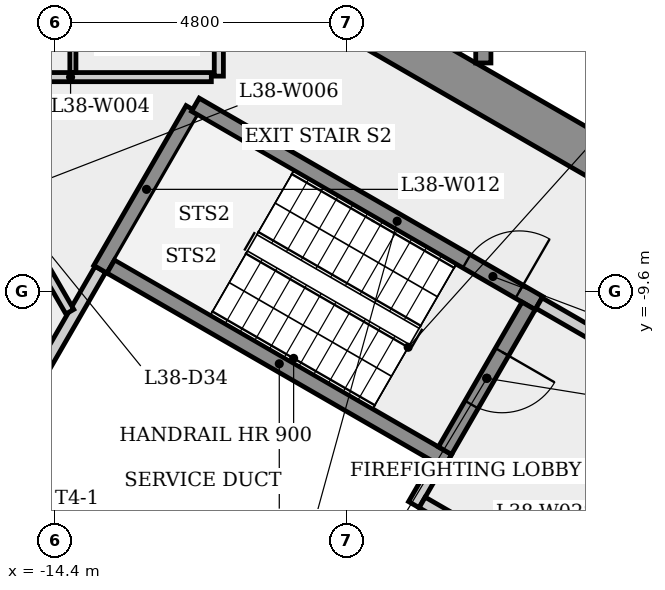
"""IFC4 building model, lengths in metres.
Left out: names, types, materials, properties, quantities, classifications, styles, units other than length and angle.
Written with IfcOpenShell. Run it as: python <this file> out.ifc"""

import sys

from ifc_helpers import new_model, si_unit, direction, frame, frame_2d, origin, place, context, subcontext, project, spatial, rectangle, extrude, element, fill, save


model = new_model("IFC4")
c1 = context("Model", 3, precision=1e-05, world=origin(), true_north=direction((0.0, 1.0)))
c2 = subcontext(c1, "Body", "Model", "MODEL_VIEW")
j1 = project(units=[si_unit("LENGTHUNIT", "METRE"), si_unit("PLANEANGLEUNIT", "RADIAN")], contexts=[c1])
p1 = place(None, origin())
s1 = spatial("IfcSite", under=j1, at=p1, CompositionType="ELEMENT")
p2 = place(p1, origin())
s2 = spatial("IfcBuilding", under=s1, at=p2, CompositionType="ELEMENT")
p3 = place(p2, frame((0.0, 0.0, 143.9)))
s3 = spatial("IfcBuildingStorey", under=s2, at=p3, CompositionType="ELEMENT", Elevation=143.9)
p4 = place(p3, frame((-9.325, -5.182, 0.0), z_axis=(0.0, 0.0, 1.0), x_axis=(0.866023993627, -0.500002442456, 0.0)))
e1 = element("IfcWall", 1, at=p4, inside=s3, PredefinedType="SHEAR", context=c2, shape_type="SweptSolid", body=[
    extrude(rectangle(XDim=10.97, YDim=0.7, at=frame_2d((5.485, 0.0))), origin(), (0.0, 0.0, 1.0), 4.0),
])
p5 = place(p4, frame((5.682, 0.0, 0.0)))
e2 = element("IfcOpeningElement", 2, at=p5, cuts=e1, PredefinedType="OPENING", context=c2, shape_type="SweptSolid", body=[
    extrude(rectangle(XDim=0.9, YDim=2.1, at=frame_2d((0.45, 1.05))), frame((0.0, 0.36, 0.0), z_axis=(0.0, -1.0, 0.0), x_axis=(1.0, 0.0, 0.0)), (0.0, 0.0, 1.0), 0.72),
])
p6 = place(p3, frame((-16.453, -6.078, 0.0), z_axis=(0.0, 0.0, 1.0), x_axis=(1.0, 0.0, 0.0)))
e3 = element("IfcWall", 3, at=p6, inside=s3, PredefinedType="PARTITIONING", context=c2, shape_type="SweptSolid", body=[
    extrude(rectangle(XDim=4.63, YDim=0.15, at=frame_2d((2.315, 0.0))), origin(), (0.0, 0.0, 1.0), 3.6),
])
p7 = place(p6, frame((0.766, 0.0, 0.0)))
e4 = element("IfcOpeningElement", 4, at=p7, cuts=e3, PredefinedType="OPENING", context=c2, shape_type="SweptSolid", body=[
    extrude(rectangle(XDim=0.9, YDim=2.1, at=frame_2d((0.45, 1.05))), frame((0.0, 0.085, 0.0), z_axis=(0.0, -1.0, 0.0), x_axis=(1.0, 0.0, 0.0)), (0.0, 0.0, 1.0), 0.17),
])
p8 = place(p3, frame((-16.276, -13.791, 0.0), z_axis=(0.0, 0.0, 1.0), x_axis=(0.499970375258, 0.866042506961, 0.0)))
e5 = element("IfcWall", 5, at=p8, inside=s3, PredefinedType="PLUMBINGWALL", context=c2, shape_type="SweptSolid", body=[
    extrude(rectangle(XDim=5.257, YDim=0.2, at=frame_2d((2.628, 0.0))), origin(), (0.0, 0.0, 1.0), 3.6),
])
p9 = place(p3, frame((-14.151, -9.937, 0.0), z_axis=(0.0, 0.0, 1.0), x_axis=(-0.500029633093, 0.866008294434, 0.0)))
e6 = element("IfcWall", 6, at=p9, inside=s3, PredefinedType="PARTITIONING", context=c2, shape_type="SweptSolid", body=[
    extrude(rectangle(XDim=4.38, YDim=0.15, at=frame_2d((2.19, 0.0))), origin(), (0.0, 0.0, 1.0), 3.6),
])
p10 = place(p9, frame((1.69, 0.0, 0.0)))
e7 = element("IfcOpeningElement", 7, at=p10, cuts=e6, PredefinedType="OPENING", context=c2, shape_type="SweptSolid", body=[
    extrude(rectangle(XDim=1.0, YDim=2.1, at=frame_2d((0.5, 1.05))), frame((0.0, 0.085, 0.0), z_axis=(0.0, -1.0, 0.0), x_axis=(1.0, 0.0, 0.0)), (0.0, 0.0, 1.0), 0.17),
])
p11 = place(p3, frame((-14.1, -3.676, 0.0), z_axis=(0.0, 0.0, 1.0), x_axis=(0.0, -1.0, 0.0)))
e8 = element("IfcWall", 8, at=p11, inside=s3, PredefinedType="PARTITIONING", context=c2, shape_type="SweptSolid", body=[
    extrude(rectangle(XDim=2.327, YDim=0.1, at=frame_2d((1.164, 0.0))), origin(), (0.0, 0.0, 1.0), 3.6),
])
p12 = place(p3, frame((-13.648, -9.239, 0.0), z_axis=(0.0, 0.0, 1.0), x_axis=(0.50000556753, 0.866022189346, 0.0)))
e9 = element("IfcWall", 9, at=p12, inside=s3, PredefinedType="SHEAR", context=c2, shape_type="SweptSolid", body=[
    extrude(rectangle(XDim=3.036, YDim=0.25, at=frame_2d((1.518, 0.0))), origin(), (0.0, 0.0, 1.0), 3.6),
])
p13 = place(p3, frame((-12.085, -6.532, 0.0), z_axis=(0.0, 0.0, 1.0), x_axis=(0.86604373436, -0.499968249168, 0.0)))
e10 = element("IfcWall", 10, at=p13, inside=s3, PredefinedType="SHEAR", context=c2, shape_type="SweptSolid", body=[
    extrude(rectangle(XDim=1.118, YDim=0.25, at=frame_2d((0.559, 0.0))), origin(), (0.0, 0.0, 1.0), 3.6),
])
p14 = place(p3, frame((-11.7, 6.062, 0.0), z_axis=(0.0, 0.0, 1.0), x_axis=(0.0, -1.0, 0.0)))
e11 = element("IfcWall", 11, at=p14, inside=s3, PredefinedType="PARTITIONING", context=c2, shape_type="SweptSolid", body=[
    extrude(rectangle(XDim=12.125, YDim=0.15, at=frame_2d((6.062, 0.0))), origin(), (0.0, 0.0, 1.0), 3.6),
])
p15 = place(p14, frame((6.788, 0.0, 0.0)))
e12 = element("IfcOpeningElement", 12, at=p15, cuts=e11, PredefinedType="OPENING", context=c2, shape_type="SweptSolid", body=[
    extrude(rectangle(XDim=0.9, YDim=2.1, at=frame_2d((0.45, 1.05))), frame((0.0, 0.085, 0.0), z_axis=(0.0, -1.0, 0.0), x_axis=(1.0, 0.0, 0.0)), (0.0, 0.0, 1.0), 0.17),
])
p16 = place(p3, frame((-11.1, -7.101, 0.0), z_axis=(0.0, 0.0, 1.0), x_axis=(0.866028615007, -0.499994437958, 0.0)))
e13 = element("IfcWall", 13, at=p16, inside=s3, PredefinedType="SHEAR", context=c2, shape_type="SweptSolid", body=[
    extrude(rectangle(XDim=5.387, YDim=0.25, at=frame_2d((2.694, 0.0))), origin(), (0.0, 0.0, 1.0), 3.6),
])
p17 = place(p16, frame((4.012, 0.0, 0.0)))
e14 = element("IfcOpeningElement", 14, at=p17, cuts=e13, PredefinedType="OPENING", context=c2, shape_type="SweptSolid", body=[
    extrude(rectangle(XDim=1.0, YDim=2.1, at=frame_2d((0.5, 1.05))), frame((0.0, 0.135, 0.0), z_axis=(0.0, -1.0, 0.0), x_axis=(1.0, 0.0, 0.0)), (0.0, 0.0, 1.0), 0.27),
])
p18 = place(p3, frame((-8.493, -13.11, 0.0), z_axis=(0.0, 0.0, 1.0), x_axis=(0.500067724834, 0.865986299303, 0.0)))
e15 = element("IfcWall", 15, at=p18, inside=s3, PredefinedType="PLUMBINGWALL", context=c2, shape_type="SweptSolid", body=[
    extrude(rectangle(XDim=0.775, YDim=0.2, at=frame_2d((0.388, 0.0))), origin(), (0.0, 0.0, 1.0), 3.6),
])
p19 = place(p3, frame((-7.935, -12.393, 0.0), z_axis=(0.0, 0.0, 1.0), x_axis=(-0.866025499775, 0.499999833739, 0.0)))
e16 = element("IfcWall", 16, at=p19, inside=s3, PredefinedType="SHEAR", context=c2, shape_type="SweptSolid", body=[
    extrude(rectangle(XDim=6.4, YDim=0.25, at=frame_2d((3.2, 0.0))), origin(), (0.0, 0.0, 1.0), 3.6),
])
p20 = place(p3, frame((-8.356, -13.073, 0.0), z_axis=(0.0, 0.0, 1.0), x_axis=(0.866038532462, -0.499977259774, 0.0)))
e17 = element("IfcWall", 17, at=p20, inside=s3, PredefinedType="PLUMBINGWALL", context=c2, shape_type="SweptSolid", body=[
    extrude(rectangle(XDim=4.7, YDim=0.2, at=frame_2d((2.35, 0.0))), origin(), (0.0, 0.0, 1.0), 3.6),
])
p21 = place(p3, frame((-7.35, -5.846, 0.0), z_axis=(0.0, 0.0, 1.0), x_axis=(0.0, 1.0, 0.0)))
e18 = element("IfcWall", 18, at=p21, inside=s3, PredefinedType="SHEAR", context=c2, shape_type="SweptSolid", body=[
    extrude(rectangle(XDim=4.171, YDim=0.25, at=frame_2d((2.085, 0.0))), origin(), (0.0, 0.0, 1.0), 3.6),
])
p22 = place(p3, frame((-6.605, -9.841, 0.0), z_axis=(0.0, 0.0, 1.0), x_axis=(-0.499996545922, -0.866027397988, 0.0)))
e19 = element("IfcWall", 19, at=p22, inside=s3, PredefinedType="SHEAR", context=c2, shape_type="SweptSolid", body=[
    extrude(rectangle(XDim=2.75, YDim=0.25, at=frame_2d((1.375, 0.0))), origin(), (0.0, 0.0, 1.0), 3.6),
])
p23 = place(p22, frame((0.875, 0.0, 0.0)))
e20 = element("IfcOpeningElement", 20, at=p23, cuts=e19, PredefinedType="OPENING", context=c2, shape_type="SweptSolid", body=[
    extrude(rectangle(XDim=1.0, YDim=2.1, at=frame_2d((0.5, 1.05))), frame((0.0, 0.135, 0.0), z_axis=(0.0, -1.0, 0.0), x_axis=(1.0, 0.0, 0.0)), (0.0, 0.0, 1.0), 0.27),
])
p24 = place(p3, frame((-6.435, -9.795, 0.0), z_axis=(0.0, 0.0, 1.0), x_axis=(0.866012907634, -0.500021643343, 0.0)))
e21 = element("IfcWall", 21, at=p24, inside=s3, PredefinedType="PARTITIONING", context=c2, shape_type="SweptSolid", body=[
    extrude(rectangle(XDim=4.45, YDim=0.2, at=frame_2d((2.225, 0.0))), origin(), (0.0, 0.0, 1.0), 3.6),
])
p25 = place(p24, frame((1.675, 0.0, 0.0)))
e22 = element("IfcOpeningElement", 22, at=p25, cuts=e21, PredefinedType="OPENING", context=c2, shape_type="SweptSolid", body=[
    extrude(rectangle(XDim=1.1, YDim=2.1, at=frame_2d((0.55, 1.05))), frame((0.0, 0.11, 0.0), z_axis=(0.0, -1.0, 0.0), x_axis=(1.0, 0.0, 0.0)), (0.0, 0.0, 1.0), 0.22),
])
p26 = place(p17, origin())
e23 = element("IfcDoor", 23, at=p26, inside=s3, OperationType="SINGLE_SWING_RIGHT", PredefinedType="DOOR", context=c2, shape_type="SweptSolid", body=[
    extrude(rectangle(XDim=1.0, YDim=2.1, at=frame_2d((0.5, 1.05))), frame((0.0, 0.025, 0.0), z_axis=(0.0, -1.0, 0.0), x_axis=(1.0, 0.0, 0.0)), (0.0, 0.0, 1.0), 0.05),
])
fill(e14, e23)
p27 = place(p23, origin())
e24 = element("IfcDoor", 24, at=p27, inside=s3, OperationType="SINGLE_SWING_LEFT", PredefinedType="DOOR", context=c2, shape_type="SweptSolid", body=[
    extrude(rectangle(XDim=1.0, YDim=2.1, at=frame_2d((0.5, 1.05))), frame((0.0, 0.025, 0.0), z_axis=(0.0, -1.0, 0.0), x_axis=(1.0, 0.0, 0.0)), (0.0, 0.0, 1.0), 0.05),
])
fill(e20, e24)
save(model, sys.argv[1])
